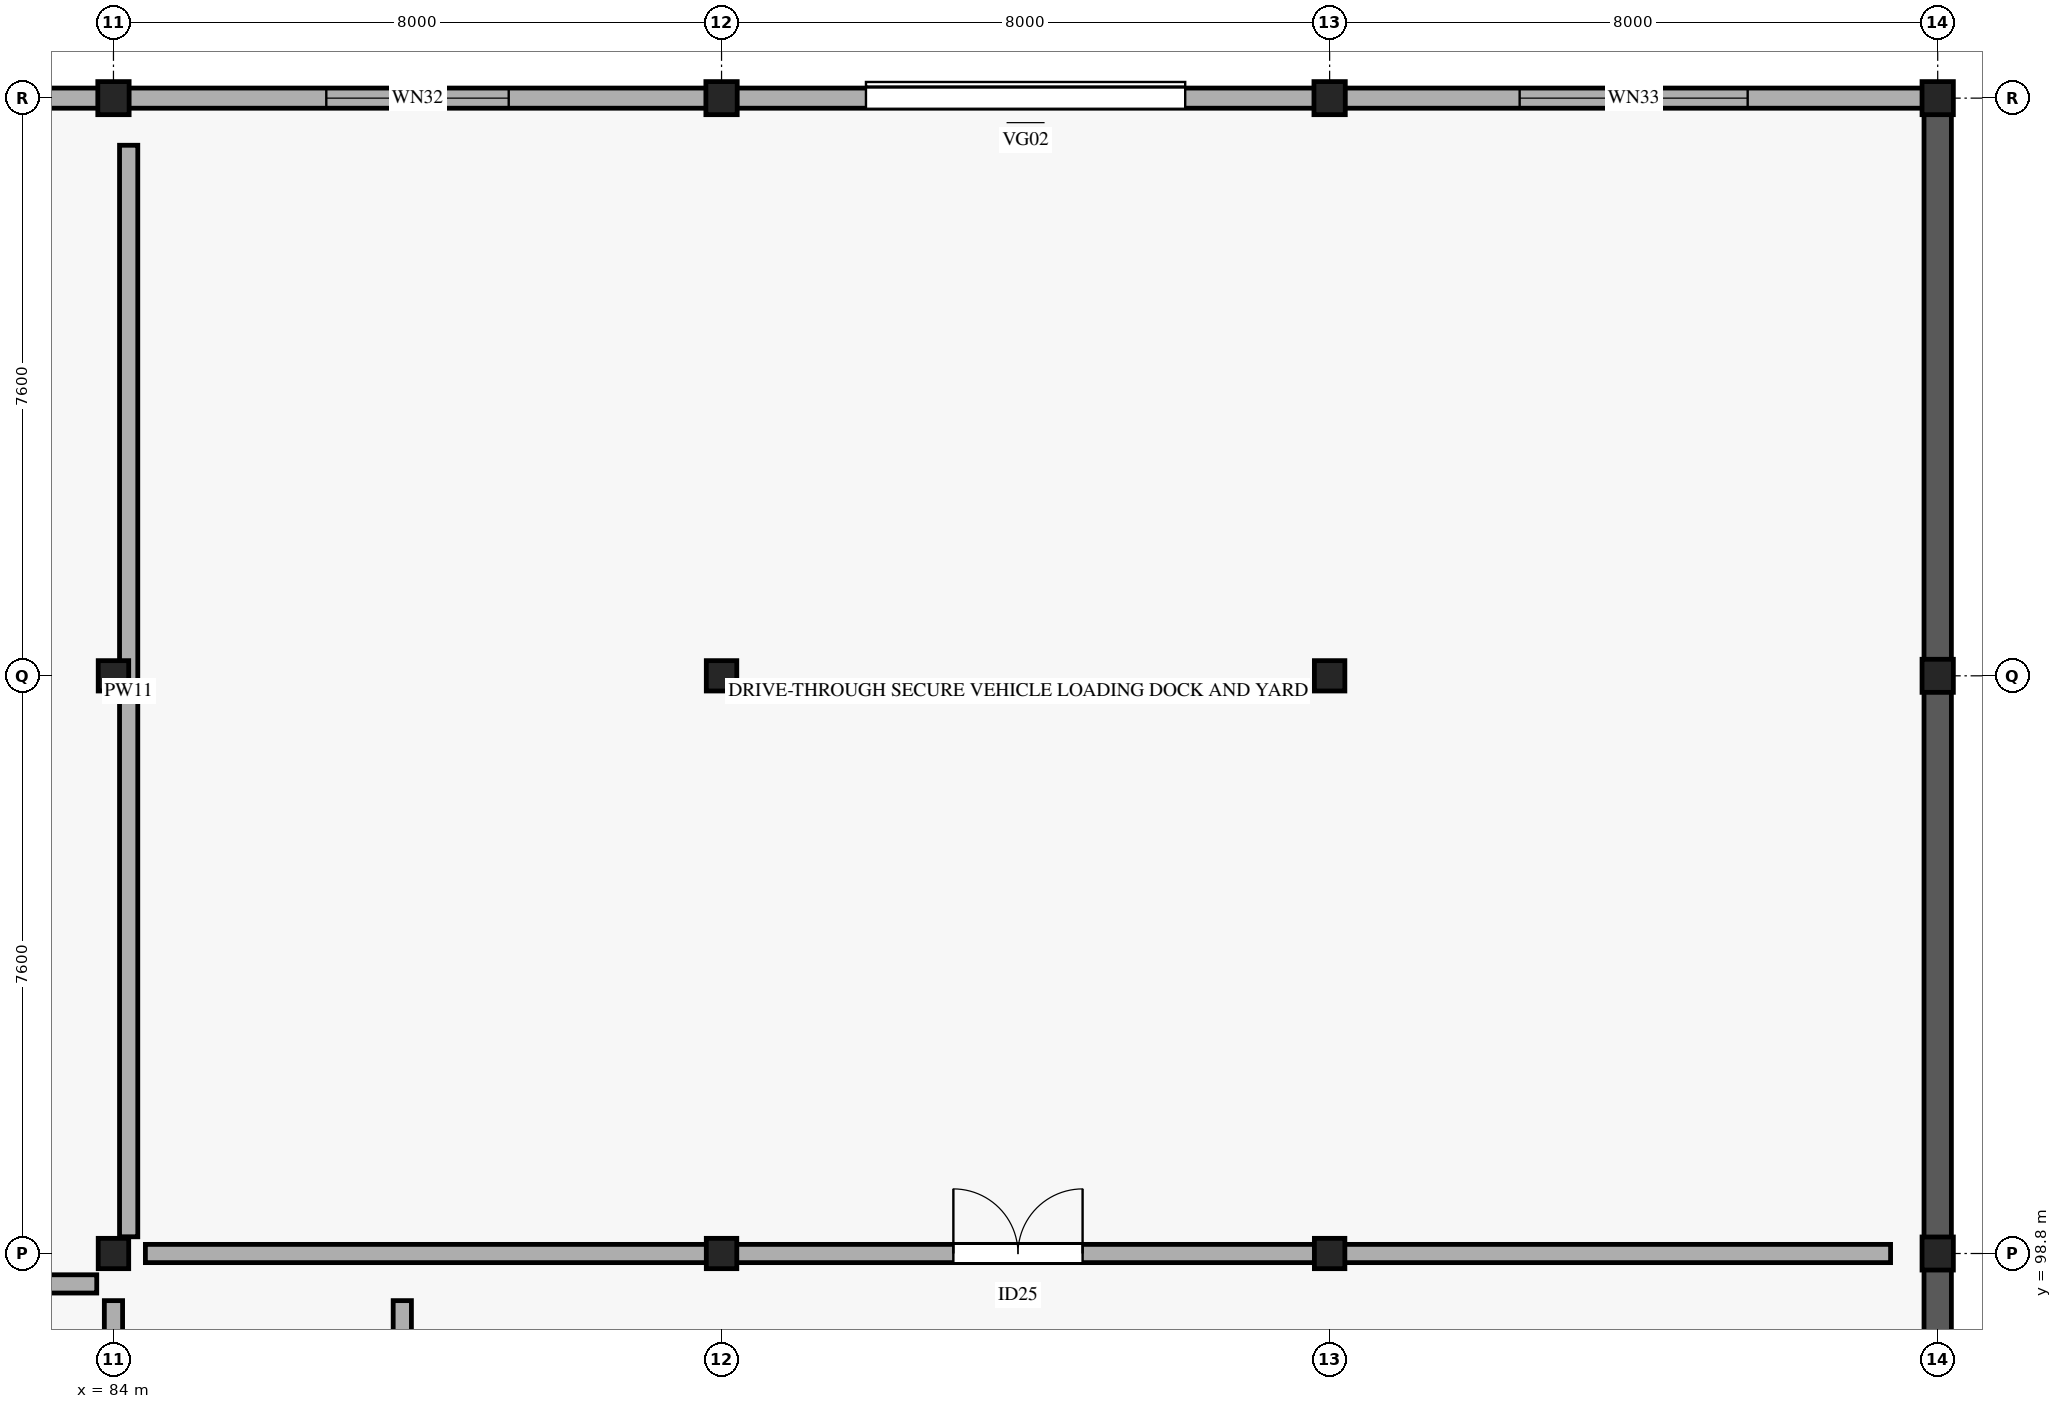
"""IFC4 building model, lengths in metres.
Left out: names, types, materials, properties, quantities, classifications, styles, units other than length and angle.
Written with IfcOpenShell. Run it as: python <this file> out.ifc"""

import sys

from ifc_helpers import new_model, si_unit, direction, frame, frame_2d, origin, origin_2d, place, context, subcontext, project, spatial, rectangle, i_section, extrude, element, fill, save


model = new_model("IFC4")
c1 = context("Model", 3, precision=1e-05, world=origin(), true_north=direction((0.0, 1.0)))
c2 = subcontext(c1, "Body", "Model", "MODEL_VIEW")
j1 = project(units=[si_unit("LENGTHUNIT", "METRE"), si_unit("PLANEANGLEUNIT", "RADIAN")], contexts=[c1])
p1 = place(None, origin())
s1 = spatial("IfcSite", under=j1, at=p1, CompositionType="ELEMENT")
p2 = place(p1, origin())
s2 = spatial("IfcBuilding", under=s1, at=p2, CompositionType="ELEMENT")
p3 = place(p2, origin())
s3 = spatial("IfcBuildingStorey", under=s2, at=p3, CompositionType="ELEMENT", Elevation=0.0)
for number, where, z_axis, x_axis in (
    (1, (84.0, 98.8, 0.0), (0.0, 0.0, 1.0), (1.0, 0.0, 0.0)),
    (2, (84.0, 106.4, 0.0), (0.0, 0.0, 1.0), (1.0, 0.0, 0.0)),
):
    element("IfcColumn", number, at=place(p3, frame(where, z_axis=z_axis, x_axis=x_axis)), inside=s3, PredefinedType="COLUMN", context=c2, shape_type="SweptSolid", body=[
        extrude(i_section(OverallWidth=0.401, OverallDepth=0.399, WebThickness=0.025, FlangeThickness=0.04, FilletRadius=0.015, at=origin_2d()), origin(), (0.0, 0.0, 1.0), 5.185),
    ])
p4 = place(p3, frame((84.0, 114.0, 0.0), z_axis=(0.0, 0.0, 1.0), x_axis=(1.0, 0.0, 0.0)))
e3 = element("IfcColumn", 3, at=p4, inside=s3, PredefinedType="COLUMN", context=c2, shape_type="SweptSolid", body=[
    extrude(i_section(OverallWidth=0.412, OverallDepth=0.435, WebThickness=0.036, FlangeThickness=0.057, FilletRadius=0.015, at=origin_2d()), origin(), (0.0, 0.0, 1.0), 5.185),
])
for number, where, z_axis, x_axis in (
    (4, (92.0, 98.8, 0.0), (0.0, 0.0, 1.0), (1.0, 0.0, 0.0)),
    (5, (92.0, 106.4, 0.0), (0.0, 0.0, 1.0), (1.0, 0.0, 0.0)),
):
    element("IfcColumn", number, at=place(p3, frame(where, z_axis=z_axis, x_axis=x_axis)), inside=s3, PredefinedType="COLUMN", context=c2, shape_type="SweptSolid", body=[
        extrude(i_section(OverallWidth=0.401, OverallDepth=0.399, WebThickness=0.025, FlangeThickness=0.04, FilletRadius=0.015, at=origin_2d()), origin(), (0.0, 0.0, 1.0), 5.185),
    ])
p5 = place(p3, frame((92.0, 114.0, 0.0), z_axis=(0.0, 0.0, 1.0), x_axis=(1.0, 0.0, 0.0)))
e6 = element("IfcColumn", 6, at=p5, inside=s3, PredefinedType="COLUMN", context=c2, shape_type="SweptSolid", body=[
    extrude(i_section(OverallWidth=0.412, OverallDepth=0.435, WebThickness=0.036, FlangeThickness=0.057, FilletRadius=0.015, at=origin_2d()), origin(), (0.0, 0.0, 1.0), 5.185),
])
for number, where, z_axis, x_axis in (
    (7, (100.0, 98.8, 0.0), (0.0, 0.0, 1.0), (1.0, 0.0, 0.0)),
    (8, (100.0, 106.4, 0.0), (0.0, 0.0, 1.0), (1.0, 0.0, 0.0)),
):
    element("IfcColumn", number, at=place(p3, frame(where, z_axis=z_axis, x_axis=x_axis)), inside=s3, PredefinedType="COLUMN", context=c2, shape_type="SweptSolid", body=[
        extrude(i_section(OverallWidth=0.401, OverallDepth=0.399, WebThickness=0.025, FlangeThickness=0.04, FilletRadius=0.015, at=origin_2d()), origin(), (0.0, 0.0, 1.0), 5.185),
    ])
for number, where, z_axis, x_axis in (
    (9, (100.0, 114.0, 0.0), (0.0, 0.0, 1.0), (1.0, 0.0, 0.0)),
    (10, (108.0, 98.8, 0.0), (0.0, 0.0, 1.0), (1.0, 0.0, 0.0)),
    (11, (108.0, 106.4, 0.0), (0.0, 0.0, 1.0), (1.0, 0.0, 0.0)),
    (12, (108.0, 114.0, 0.0), (0.0, 0.0, 1.0), (1.0, 0.0, 0.0)),
):
    element("IfcColumn", number, at=place(p3, frame(where, z_axis=z_axis, x_axis=x_axis)), inside=s3, PredefinedType="COLUMN", context=c2, shape_type="SweptSolid", body=[
        extrude(i_section(OverallWidth=0.412, OverallDepth=0.435, WebThickness=0.036, FlangeThickness=0.057, FilletRadius=0.015, at=origin_2d()), origin(), (0.0, 0.0, 1.0), 5.185),
    ])
p6 = place(p3, frame((75.98, 114.0, 0.0), z_axis=(0.0, 0.0, 1.0), x_axis=(1.0, 0.0, 0.0)))
e13 = element("IfcWall", 13, at=p6, inside=s3, PredefinedType="STANDARD", context=c2, shape_type="SweptSolid", body=[
    extrude(rectangle(XDim=8.04, YDim=0.265, at=frame_2d((4.02, 0.0))), origin(), (0.0, 0.0, 1.0), 4.25),
])
p7 = place(p6, frame((3.07, 0.0, 0.75)))
e14 = element("IfcOpeningElement", 14, at=p7, cuts=e13, PredefinedType="OPENING", context=c2, shape_type="SweptSolid", body=[
    extrude(rectangle(XDim=1.9, YDim=1.3, at=frame_2d((0.95, 0.65))), frame((0.0, 0.142, 0.0), z_axis=(0.0, -1.0, 0.0), x_axis=(1.0, 0.0, 0.0)), (0.0, 0.0, 1.0), 0.285),
])
p8 = place(p3, frame((83.98, 114.0, 0.0), z_axis=(0.0, 0.0, 1.0), x_axis=(1.0, 0.0, 0.0)))
e15 = element("IfcWall", 15, at=p8, inside=s3, PredefinedType="STANDARD", context=c2, shape_type="SweptSolid", body=[
    extrude(rectangle(XDim=8.04, YDim=0.265, at=frame_2d((4.02, 0.0))), origin(), (0.0, 0.0, 1.0), 4.25),
])
p9 = place(p8, frame((2.82, 0.0, 0.75)))
e16 = element("IfcOpeningElement", 16, at=p9, cuts=e15, PredefinedType="OPENING", context=c2, shape_type="SweptSolid", body=[
    extrude(rectangle(XDim=2.4, YDim=1.3, at=frame_2d((1.2, 0.65))), frame((0.0, 0.142, 0.0), z_axis=(0.0, -1.0, 0.0), x_axis=(1.0, 0.0, 0.0)), (0.0, 0.0, 1.0), 0.285),
])
p10 = place(p3, frame((91.98, 114.0, 0.0), z_axis=(0.0, 0.0, 1.0), x_axis=(1.0, 0.0, 0.0)))
e17 = element("IfcWall", 17, at=p10, inside=s3, PredefinedType="STANDARD", context=c2, shape_type="SweptSolid", body=[
    extrude(rectangle(XDim=8.04, YDim=0.265, at=frame_2d((4.02, 0.0))), origin(), (0.0, 0.0, 1.0), 4.25),
])
p11 = place(p10, frame((1.92, 0.0, 0.0)))
e18 = element("IfcOpeningElement", 18, at=p11, cuts=e17, PredefinedType="OPENING", context=c2, shape_type="SweptSolid", body=[
    extrude(rectangle(XDim=4.2, YDim=3.8, at=frame_2d((2.1, 1.9))), frame((0.0, 0.142, 0.0), z_axis=(0.0, -1.0, 0.0), x_axis=(1.0, 0.0, 0.0)), (0.0, 0.0, 1.0), 0.285),
])
p12 = place(p3, frame((99.98, 114.0, 0.0), z_axis=(0.0, 0.0, 1.0), x_axis=(1.0, 0.0, 0.0)))
e19 = element("IfcWall", 19, at=p12, inside=s3, PredefinedType="STANDARD", context=c2, shape_type="SweptSolid", body=[
    extrude(rectangle(XDim=8.04, YDim=0.265, at=frame_2d((4.02, 0.0))), origin(), (0.0, 0.0, 1.0), 4.25),
])
p13 = place(p12, frame((2.52, 0.0, 0.75)))
e20 = element("IfcOpeningElement", 20, at=p13, cuts=e19, PredefinedType="OPENING", context=c2, shape_type="SweptSolid", body=[
    extrude(rectangle(XDim=3.0, YDim=1.3, at=frame_2d((1.5, 0.65))), frame((0.0, 0.142, 0.0), z_axis=(0.0, -1.0, 0.0), x_axis=(1.0, 0.0, 0.0)), (0.0, 0.0, 1.0), 0.285),
])
p14 = place(p3, frame((108.0, 114.02, 0.0), z_axis=(0.0, 0.0, 1.0), x_axis=(0.0, -1.0, 0.0)))
e21 = element("IfcWall", 21, at=p14, inside=s3, PredefinedType="STANDARD", context=c2, shape_type="SweptSolid", body=[
    extrude(rectangle(XDim=7.64, YDim=0.36, at=frame_2d((3.82, 0.0))), origin(), (0.0, 0.0, 1.0), 5.19),
])
p15 = place(p3, frame((108.0, 106.42, 0.0), z_axis=(0.0, 0.0, 1.0), x_axis=(0.0, -1.0, 0.0)))
e22 = element("IfcWall", 22, at=p15, inside=s3, PredefinedType="STANDARD", context=c2, shape_type="SweptSolid", body=[
    extrude(rectangle(XDim=7.64, YDim=0.36, at=frame_2d((3.82, 0.0))), origin(), (0.0, 0.0, 1.0), 5.19),
])
p16 = place(p3, frame((108.0, 98.82, 0.0), z_axis=(0.0, 0.0, 1.0), x_axis=(0.0, -1.0, 0.0)))
e23 = element("IfcWall", 23, at=p16, inside=s3, PredefinedType="STANDARD", context=c2, shape_type="SweptSolid", body=[
    extrude(rectangle(XDim=7.64, YDim=0.36, at=frame_2d((3.82, 0.0))), origin(), (0.0, 0.0, 1.0), 5.19),
])
p17 = place(p3, frame((84.42, 98.8, 0.0), z_axis=(0.0, 0.0, 1.0), x_axis=(1.0, 0.0, 0.0)))
e24 = element("IfcWall", 24, at=p17, inside=s3, PredefinedType="PARTITIONING", context=c2, shape_type="SweptSolid", body=[
    extrude(rectangle(XDim=22.96, YDim=0.24, at=frame_2d((11.48, 0.0))), origin(), (0.0, 0.0, 1.0), 4.05),
])
p18 = place(p17, frame((10.63, 0.0, 0.0)))
e25 = element("IfcOpeningElement", 25, at=p18, cuts=e24, PredefinedType="OPENING", context=c2, shape_type="SweptSolid", body=[
    extrude(rectangle(XDim=1.7, YDim=2.3, at=frame_2d((0.85, 1.15))), frame((0.0, 0.13, 0.0), z_axis=(0.0, -1.0, 0.0), x_axis=(1.0, 0.0, 0.0)), (0.0, 0.0, 1.0), 0.26),
])
p19 = place(p3, frame((84.2, 99.02, 0.0), z_axis=(0.0, 0.0, 1.0), x_axis=(0.0, 1.0, 0.0)))
e26 = element("IfcWall", 26, at=p19, inside=s3, PredefinedType="PARTITIONING", context=c2, shape_type="SweptSolid", body=[
    extrude(rectangle(XDim=14.36, YDim=0.24, at=frame_2d((7.18, 0.0))), origin(), (0.0, 0.0, 1.0), 4.05),
])
p20 = place(p3, frame((87.8, 71.02, 0.0), z_axis=(0.0, 0.0, 1.0), x_axis=(0.0, 1.0, 0.0)))
e27 = element("IfcWall", 27, at=p20, inside=s3, PredefinedType="PARTITIONING", context=c2, shape_type="SweptSolid", body=[
    extrude(rectangle(XDim=27.16, YDim=0.24, at=frame_2d((13.58, 0.0))), origin(), (0.0, 0.0, 1.0), 4.05),
])
p21 = place(p20, frame((13.04, 0.0, 0.0)))
e28 = element("IfcOpeningElement", 28, at=p21, cuts=e27, PredefinedType="OPENING", context=c2, shape_type="SweptSolid", body=[
    extrude(rectangle(XDim=1.08, YDim=2.25, at=frame_2d((0.54, 1.125))), frame((0.0, 0.13, 0.0), z_axis=(0.0, -1.0, 0.0), x_axis=(1.0, 0.0, 0.0)), (0.0, 0.0, 1.0), 0.26),
])
p22 = place(p3, frame((84.0, 76.62, 0.0), z_axis=(0.0, 0.0, 1.0), x_axis=(0.0, 1.0, 0.0)))
e29 = element("IfcWall", 29, at=p22, inside=s3, PredefinedType="PARTITIONING", context=c2, shape_type="SweptSolid", body=[
    extrude(rectangle(XDim=21.56, YDim=0.24, at=frame_2d((10.78, 0.0))), origin(), (0.0, 0.0, 1.0), 4.05),
])
p23 = place(p22, frame((10.19, 0.0, 0.0)))
e30 = element("IfcOpeningElement", 30, at=p23, cuts=e29, PredefinedType="OPENING", context=c2, shape_type="SweptSolid", body=[
    extrude(rectangle(XDim=1.18, YDim=2.3, at=frame_2d((0.59, 1.15))), frame((0.0, 0.13, 0.0), z_axis=(0.0, -1.0, 0.0), x_axis=(1.0, 0.0, 0.0)), (0.0, 0.0, 1.0), 0.26),
])
p24 = place(p3, frame((75.42, 98.4, 0.0), z_axis=(0.0, 0.0, 1.0), x_axis=(1.0, 0.0, 0.0)))
e31 = element("IfcWall", 31, at=p24, inside=s3, PredefinedType="PARTITIONING", context=c2, shape_type="SweptSolid", body=[
    extrude(rectangle(XDim=8.36, YDim=0.24, at=frame_2d((4.18, 0.0))), origin(), (0.0, 0.0, 1.0), 4.05),
])
p25 = place(p9, origin())
e32 = element("IfcWindow", 32, at=p25, inside=s3, PartitioningType="SINGLE_PANEL", PredefinedType="WINDOW", context=c2, shape_type="SweptSolid", body=[
    extrude(rectangle(XDim=2.4, YDim=1.3, at=frame_2d((1.2, 0.65))), frame((0.0, 0.03, 0.0), z_axis=(0.0, -1.0, 0.0), x_axis=(1.0, 0.0, 0.0)), (0.0, 0.0, 1.0), 0.06),
])
fill(e16, e32)
p26 = place(p11, origin())
e33 = element("IfcDoor", 33, at=p26, inside=s3, OperationType="SLIDING_TO_LEFT", PredefinedType="GATE", context=c2, shape_type="SweptSolid", body=[
    extrude(rectangle(XDim=4.2, YDim=3.8, at=frame_2d((2.1, 1.9))), frame((0.0, 0.025, 0.0), z_axis=(0.0, -1.0, 0.0), x_axis=(1.0, 0.0, 0.0)), (0.0, 0.0, 1.0), 0.05),
])
fill(e18, e33)
p27 = place(p13, origin())
e34 = element("IfcWindow", 34, at=p27, inside=s3, PartitioningType="SINGLE_PANEL", PredefinedType="WINDOW", context=c2, shape_type="SweptSolid", body=[
    extrude(rectangle(XDim=3.0, YDim=1.3, at=frame_2d((1.5, 0.65))), frame((0.0, 0.03, 0.0), z_axis=(0.0, -1.0, 0.0), x_axis=(1.0, 0.0, 0.0)), (0.0, 0.0, 1.0), 0.06),
])
fill(e20, e34)
p28 = place(p18, origin())
e35 = element("IfcDoor", 35, at=p28, inside=s3, OperationType="DOUBLE_DOOR_SINGLE_SWING", PredefinedType="DOOR", context=c2, shape_type="SweptSolid", body=[
    extrude(rectangle(XDim=1.7, YDim=2.3, at=frame_2d((0.85, 1.15))), frame((0.0, 0.025, 0.0), z_axis=(0.0, -1.0, 0.0), x_axis=(1.0, 0.0, 0.0)), (0.0, 0.0, 1.0), 0.05),
])
fill(e25, e35)
save(model, sys.argv[1])
